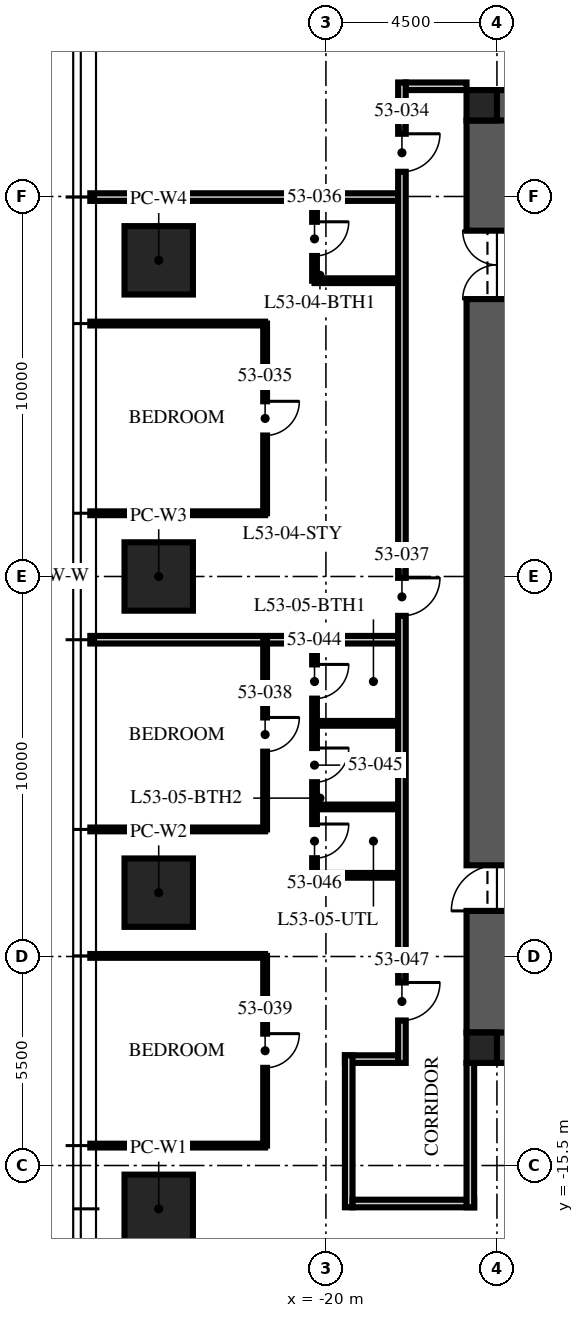
"""IFC4 building model, lengths in metres.
Left out: names, types, materials, properties, quantities, classifications, styles, units other than length and angle.
Written with IfcOpenShell. Run it as: python <this file> out.ifc"""

import sys

from ifc_helpers import new_model, si_unit, direction, frame, frame_2d, origin, origin_2d, place, context, subcontext, project, spatial, rectangle, extrude, element, fill, save


model = new_model("IFC4")
c1 = context("Model", 3, precision=1e-05, world=origin(), true_north=direction((0.0, 1.0)))
c2 = subcontext(c1, "Body", "Model", "MODEL_VIEW")
j1 = project(units=[si_unit("LENGTHUNIT", "METRE"), si_unit("PLANEANGLEUNIT", "RADIAN")], contexts=[c1])
p1 = place(None, origin())
s1 = spatial("IfcSite", under=j1, at=p1, CompositionType="ELEMENT")
p2 = place(p1, origin())
s2 = spatial("IfcBuilding", under=s1, at=p2, CompositionType="ELEMENT")
p3 = place(p2, frame((0.0, 0.0, 214.5)))
s3 = spatial("IfcBuildingStorey", under=s2, at=p3, CompositionType="ELEMENT", Elevation=214.5)
for number, where, z_axis, x_axis in (
    (1, (-15.5, 12.0, -0.25), (0.0, 0.0, 1.0), (1.0, 0.0, 0.0)),
    (2, (-15.5, -12.0, -0.25), (0.0, 0.0, 1.0), (1.0, 0.0, 0.0)),
):
    element("IfcWall", number, at=place(p3, frame(where, z_axis=z_axis, x_axis=x_axis)), inside=s3, PredefinedType="SHEAR", context=c2, shape_type="SweptSolid", body=[
        extrude(rectangle(XDim=31.0, YDim=1.6, at=frame_2d((15.5, 0.0))), origin(), (0.0, 0.0, 1.0), 3.75),
    ])
p4 = place(p3, frame((-15.5, -12.0, -0.25), z_axis=(0.0, 0.0, 1.0), x_axis=(0.0, 1.0, 0.0)))
e3 = element("IfcWall", 3, at=p4, inside=s3, PredefinedType="SHEAR", context=c2, shape_type="SweptSolid", body=[
    extrude(rectangle(XDim=24.0, YDim=1.6, at=frame_2d((12.0, 0.0))), origin(), (0.0, 0.0, 1.0), 3.75),
])
p5 = place(p4, frame((3.2, 0.0, 0.25)))
e4 = element("IfcOpeningElement", 4, at=p5, cuts=e3, PredefinedType="OPENING", context=c2, shape_type="SweptSolid", body=[
    extrude(rectangle(XDim=1.2, YDim=2.1, at=frame_2d((0.6, 1.05))), frame((0.0, 0.81, 0.0), z_axis=(0.0, -1.0, 0.0), x_axis=(1.0, 0.0, 0.0)), (0.0, 0.0, 1.0), 1.62),
])
p6 = place(p4, frame((19.3, 0.0, 0.25)))
e5 = element("IfcOpeningElement", 5, at=p6, cuts=e3, PredefinedType="OPENING", context=c2, shape_type="SweptSolid", body=[
    extrude(rectangle(XDim=1.8, YDim=2.1, at=frame_2d((0.9, 1.05))), frame((0.0, 0.81, 0.0), z_axis=(0.0, -1.0, 0.0), x_axis=(1.0, 0.0, 0.0)), (0.0, 0.0, 1.0), 1.62),
])
for number, where, z_axis, x_axis in (
    (6, (-15.9, 12.4, -0.25), (0.0, 0.0, 1.0), (1.0, 0.0, 0.0)),
    (7, (-15.9, -12.4, -0.25), (0.0, 0.0, 1.0), (1.0, 0.0, 0.0)),
):
    element("IfcColumn", number, at=place(p3, frame(where, z_axis=z_axis, x_axis=x_axis)), inside=s3, PredefinedType="COLUMN", context=c2, shape_type="SweptSolid", body=[
        extrude(rectangle(XDim=0.8, YDim=0.8, at=origin_2d()), origin(), (0.0, 0.0, 1.0), 3.75),
    ])
for number, where, z_axis, x_axis in (
    (8, (-24.4, -16.64, 0.0), (0.0, 0.0, 1.0), (0.0, 1.0, 0.0)),
    (9, (-24.4, -8.32, 0.0), (0.0, 0.0, 1.0), (0.0, 1.0, 0.0)),
    (10, (-24.4, 0.0, 0.0), (0.0, 0.0, 1.0), (0.0, 1.0, 0.0)),
    (11, (-24.4, 8.32, 0.0), (0.0, 0.0, 1.0), (0.0, 1.0, 0.0)),
):
    element("IfcColumn", number, at=place(p3, frame(where, z_axis=z_axis, x_axis=x_axis)), inside=s3, PredefinedType="COLUMN", context=c2, shape_type="SweptSolid", body=[
        extrude(rectangle(XDim=1.8, YDim=1.8, at=origin_2d()), origin(), (0.0, 0.0, 1.0), 3.75),
    ])
p7 = place(p3, frame((-18.1, -12.7, 0.0), z_axis=(0.0, 0.0, 1.0), x_axis=(-1.0, 0.0, 0.0)))
e12 = element("IfcWall", 12, at=p7, inside=s3, PredefinedType="PARTITIONING", context=c2, shape_type="SweptSolid", body=[
    extrude(rectangle(XDim=1.4, YDim=0.2, at=frame_2d((0.7, 0.0))), origin(), (0.0, 0.0, 1.0), 2.81),
])
p8 = place(p3, frame((-19.4, -12.6, 0.0), z_axis=(0.0, 0.0, 1.0), x_axis=(0.0, -1.0, 0.0)))
e13 = element("IfcWall", 13, at=p8, inside=s3, PredefinedType="PARTITIONING", context=c2, shape_type="SweptSolid", body=[
    extrude(rectangle(XDim=4.0, YDim=0.2, at=frame_2d((2.0, 0.0))), origin(), (0.0, 0.0, 1.0), 2.6),
])
p9 = place(p3, frame((-19.3, -16.5, 0.0), z_axis=(0.0, 0.0, 1.0), x_axis=(1.0, 0.0, 0.0)))
e14 = element("IfcWall", 14, at=p9, inside=s3, PredefinedType="PARTITIONING", context=c2, shape_type="SweptSolid", body=[
    extrude(rectangle(XDim=3.2, YDim=0.2, at=frame_2d((1.6, 0.0))), origin(), (0.0, 0.0, 1.0), 2.3),
])
p10 = place(p3, frame((-16.2, -16.6, 0.0), z_axis=(0.0, 0.0, 1.0), x_axis=(0.0, 1.0, 0.0)))
e15 = element("IfcWall", 15, at=p10, inside=s3, PredefinedType="PARTITIONING", context=c2, shape_type="SweptSolid", body=[
    extrude(rectangle(XDim=3.8, YDim=0.2, at=frame_2d((1.9, 0.0))), origin(), (0.0, 0.0, 1.0), 2.3),
])
p11 = place(p3, frame((-16.3, 12.9, 0.0), z_axis=(0.0, 0.0, 1.0), x_axis=(-1.0, 0.0, 0.0)))
e16 = element("IfcWall", 16, at=p11, inside=s3, PredefinedType="PARTITIONING", context=c2, shape_type="SweptSolid", body=[
    extrude(rectangle(XDim=1.6, YDim=0.2, at=frame_2d((0.8, 0.0))), origin(), (0.0, 0.0, 1.0), 2.3),
])
p12 = place(p3, frame((-18.1, 9.984, 0.0), z_axis=(0.0, 0.0, 1.0), x_axis=(-1.0, 0.0, 0.0)))
e17 = element("IfcWall", 17, at=p12, inside=s3, PredefinedType="PARTITIONING", context=c2, shape_type="SweptSolid", body=[
    extrude(rectangle(XDim=8.1, YDim=0.2, at=frame_2d((4.05, 0.0))), origin(), (0.0, 0.0, 1.0), 2.91),
])
for number, where, z_axis, x_axis in (
    (18, (-21.6, 6.656, 0.0), (0.0, 0.0, 1.0), (-1.0, 0.0, 0.0)),
    (19, (-21.6, 1.664, 0.0), (0.0, 0.0, 1.0), (-1.0, 0.0, 0.0)),
):
    element("IfcWall", number, at=place(p3, frame(where, z_axis=z_axis, x_axis=x_axis)), inside=s3, PredefinedType="PARTITIONING", context=c2, shape_type="SweptSolid", body=[
        extrude(rectangle(XDim=4.6, YDim=0.1, at=frame_2d((2.3, 0.0))), origin(), (0.0, 0.0, 1.0), 2.91),
    ])
p13 = place(p3, frame((-18.1, -1.664, 0.0), z_axis=(0.0, 0.0, 1.0), x_axis=(-1.0, 0.0, 0.0)))
e20 = element("IfcWall", 20, at=p13, inside=s3, PredefinedType="PARTITIONING", context=c2, shape_type="SweptSolid", body=[
    extrude(rectangle(XDim=8.1, YDim=0.2, at=frame_2d((4.05, 0.0))), origin(), (0.0, 0.0, 1.0), 2.91),
])
for number, where, z_axis, x_axis in (
    (21, (-21.6, -6.656, 0.0), (0.0, 0.0, 1.0), (-1.0, 0.0, 0.0)),
    (22, (-21.6, -9.984, 0.0), (0.0, 0.0, 1.0), (-1.0, 0.0, 0.0)),
    (23, (-21.6, -14.976, 0.0), (0.0, 0.0, 1.0), (-1.0, 0.0, 0.0)),
):
    element("IfcWall", number, at=place(p3, frame(where, z_axis=z_axis, x_axis=x_axis)), inside=s3, PredefinedType="PARTITIONING", context=c2, shape_type="SweptSolid", body=[
        extrude(rectangle(XDim=4.6, YDim=0.1, at=frame_2d((2.3, 0.0))), origin(), (0.0, 0.0, 1.0), 2.91),
    ])
p14 = place(p3, frame((-21.6, 6.656, 0.0), z_axis=(0.0, 0.0, 1.0), x_axis=(0.0, -1.0, 0.0)))
e24 = element("IfcWall", 24, at=p14, inside=s3, PredefinedType="PARTITIONING", context=c2, shape_type="SweptSolid", body=[
    extrude(rectangle(XDim=4.992, YDim=0.1, at=frame_2d((2.496, 0.0))), origin(), (0.0, 0.0, 1.0), 2.81),
])
p15 = place(p14, frame((2.046, 0.0, 0.0)))
e25 = element("IfcOpeningElement", 25, at=p15, cuts=e24, PredefinedType="OPENING", context=c2, shape_type="SweptSolid", body=[
    extrude(rectangle(XDim=0.9, YDim=2.1, at=frame_2d((0.45, 1.05))), frame((0.0, 0.06, 0.0), z_axis=(0.0, -1.0, 0.0), x_axis=(1.0, 0.0, 0.0)), (0.0, 0.0, 1.0), 0.12),
])
p16 = place(p3, frame((-20.3, 9.984, 0.0), z_axis=(0.0, 0.0, 1.0), x_axis=(0.0, -1.0, 0.0)))
e26 = element("IfcWall", 26, at=p16, inside=s3, PredefinedType="PARTITIONING", context=c2, shape_type="SweptSolid", body=[
    extrude(rectangle(XDim=2.2, YDim=0.125, at=frame_2d((1.1, 0.0))), origin(), (0.0, 0.0, 1.0), 2.6),
])
p17 = place(p16, frame((0.65, 0.0, 0.0)))
e27 = element("IfcOpeningElement", 27, at=p17, cuts=e26, PredefinedType="OPENING", context=c2, shape_type="SweptSolid", body=[
    extrude(rectangle(XDim=0.9, YDim=2.1, at=frame_2d((0.45, 1.05))), frame((0.0, 0.073, 0.0), z_axis=(0.0, -1.0, 0.0), x_axis=(1.0, 0.0, 0.0)), (0.0, 0.0, 1.0), 0.145),
])
p18 = place(p3, frame((-18.1, 7.784, 0.0), z_axis=(0.0, 0.0, 1.0), x_axis=(-1.0, 0.0, 0.0)))
e28 = element("IfcWall", 28, at=p18, inside=s3, PredefinedType="PARTITIONING", context=c2, shape_type="SweptSolid", body=[
    extrude(rectangle(XDim=2.2, YDim=0.125, at=frame_2d((1.1, 0.0))), origin(), (0.0, 0.0, 1.0), 3.5),
])
p19 = place(p3, frame((-21.6, -1.664, 0.0), z_axis=(0.0, 0.0, 1.0), x_axis=(0.0, -1.0, 0.0)))
e29 = element("IfcWall", 29, at=p19, inside=s3, PredefinedType="PARTITIONING", context=c2, shape_type="SweptSolid", body=[
    extrude(rectangle(XDim=4.992, YDim=0.1, at=frame_2d((2.496, 0.0))), origin(), (0.0, 0.0, 1.0), 2.81),
])
p20 = place(p19, frame((2.046, 0.0, 0.0)))
e30 = element("IfcOpeningElement", 30, at=p20, cuts=e29, PredefinedType="OPENING", context=c2, shape_type="SweptSolid", body=[
    extrude(rectangle(XDim=0.9, YDim=2.1, at=frame_2d((0.45, 1.05))), frame((0.0, 0.06, 0.0), z_axis=(0.0, -1.0, 0.0), x_axis=(1.0, 0.0, 0.0)), (0.0, 0.0, 1.0), 0.12),
])
p21 = place(p3, frame((-21.6, -9.984, 0.0), z_axis=(0.0, 0.0, 1.0), x_axis=(0.0, -1.0, 0.0)))
e31 = element("IfcWall", 31, at=p21, inside=s3, PredefinedType="PARTITIONING", context=c2, shape_type="SweptSolid", body=[
    extrude(rectangle(XDim=4.992, YDim=0.1, at=frame_2d((2.496, 0.0))), origin(), (0.0, 0.0, 1.0), 2.81),
])
p22 = place(p21, frame((2.046, 0.0, 0.0)))
e32 = element("IfcOpeningElement", 32, at=p22, cuts=e31, PredefinedType="OPENING", context=c2, shape_type="SweptSolid", body=[
    extrude(rectangle(XDim=0.9, YDim=2.1, at=frame_2d((0.45, 1.05))), frame((0.0, 0.06, 0.0), z_axis=(0.0, -1.0, 0.0), x_axis=(1.0, 0.0, 0.0)), (0.0, 0.0, 1.0), 0.12),
])
p23 = place(p3, frame((-20.3, -1.664, 0.0), z_axis=(0.0, 0.0, 1.0), x_axis=(0.0, -1.0, 0.0)))
e33 = element("IfcWall", 33, at=p23, inside=s3, PredefinedType="PARTITIONING", context=c2, shape_type="SweptSolid", body=[
    extrude(rectangle(XDim=6.2, YDim=0.125, at=frame_2d((3.1, 0.0))), origin(), (0.0, 0.0, 1.0), 2.81),
])
p24 = place(p23, frame((0.65, 0.0, 0.0)))
e34 = element("IfcOpeningElement", 34, at=p24, cuts=e33, PredefinedType="OPENING", context=c2, shape_type="SweptSolid", body=[
    extrude(rectangle(XDim=0.9, YDim=2.1, at=frame_2d((0.45, 1.05))), frame((0.0, 0.073, 0.0), z_axis=(0.0, -1.0, 0.0), x_axis=(1.0, 0.0, 0.0)), (0.0, 0.0, 1.0), 0.145),
])
p25 = place(p23, frame((2.85, 0.0, 0.0)))
e35 = element("IfcOpeningElement", 35, at=p25, cuts=e33, PredefinedType="OPENING", context=c2, shape_type="SweptSolid", body=[
    extrude(rectangle(XDim=0.9, YDim=2.1, at=frame_2d((0.45, 1.05))), frame((0.0, 0.073, 0.0), z_axis=(0.0, -1.0, 0.0), x_axis=(1.0, 0.0, 0.0)), (0.0, 0.0, 1.0), 0.145),
])
p26 = place(p23, frame((4.85, 0.0, 0.0)))
e36 = element("IfcOpeningElement", 36, at=p26, cuts=e33, PredefinedType="OPENING", context=c2, shape_type="SweptSolid", body=[
    extrude(rectangle(XDim=0.9, YDim=2.1, at=frame_2d((0.45, 1.05))), frame((0.0, 0.073, 0.0), z_axis=(0.0, -1.0, 0.0), x_axis=(1.0, 0.0, 0.0)), (0.0, 0.0, 1.0), 0.145),
])
for number, where, z_axis, x_axis in (
    (37, (-18.1, -3.864, 0.0), (0.0, 0.0, 1.0), (-1.0, 0.0, 0.0)),
    (38, (-18.1, -6.064, 0.0), (0.0, 0.0, 1.0), (-1.0, 0.0, 0.0)),
    (39, (-18.1, -7.864, 0.0), (0.0, 0.0, 1.0), (-1.0, 0.0, 0.0)),
):
    element("IfcWall", number, at=place(p3, frame(where, z_axis=z_axis, x_axis=x_axis)), inside=s3, PredefinedType="PARTITIONING", context=c2, shape_type="SweptSolid", body=[
        extrude(rectangle(XDim=2.2, YDim=0.125, at=frame_2d((1.1, 0.0))), origin(), (0.0, 0.0, 1.0), 3.5),
    ])
p27 = place(p3, frame((-18.0, 13.0, 0.0), z_axis=(0.0, 0.0, 1.0), x_axis=(0.0, -1.0, 0.0)))
e40 = element("IfcWall", 40, at=p27, inside=s3, PredefinedType="PARTITIONING", context=c2, shape_type="SweptSolid", body=[
    extrude(rectangle(XDim=25.8, YDim=0.2, at=frame_2d((12.9, 0.0))), origin(), (0.0, 0.0, 1.0), 2.6),
])
p28 = place(p27, frame((1.35, 0.0, 0.0)))
e41 = element("IfcOpeningElement", 41, at=p28, cuts=e40, PredefinedType="OPENING", context=c2, shape_type="SweptSolid", body=[
    extrude(rectangle(XDim=1.0, YDim=2.2, at=frame_2d((0.5, 1.1))), frame((0.0, 0.11, 0.0), z_axis=(0.0, -1.0, 0.0), x_axis=(1.0, 0.0, 0.0)), (0.0, 0.0, 1.0), 0.22),
])
p29 = place(p27, frame((13.036, 0.0, 0.0)))
e42 = element("IfcOpeningElement", 42, at=p29, cuts=e40, PredefinedType="OPENING", context=c2, shape_type="SweptSolid", body=[
    extrude(rectangle(XDim=1.0, YDim=2.2, at=frame_2d((0.5, 1.1))), frame((0.0, 0.11, 0.0), z_axis=(0.0, -1.0, 0.0), x_axis=(1.0, 0.0, 0.0)), (0.0, 0.0, 1.0), 0.22),
])
p30 = place(p27, frame((23.684, 0.0, 0.0)))
e43 = element("IfcOpeningElement", 43, at=p30, cuts=e40, PredefinedType="OPENING", context=c2, shape_type="SweptSolid", body=[
    extrude(rectangle(XDim=1.0, YDim=2.2, at=frame_2d((0.5, 1.1))), frame((0.0, 0.11, 0.0), z_axis=(0.0, -1.0, 0.0), x_axis=(1.0, 0.0, 0.0)), (0.0, 0.0, 1.0), 0.22),
])
p31 = place(p5, origin())
e44 = element("IfcDoor", 44, at=p31, inside=s3, OperationType="SINGLE_SWING_LEFT", PredefinedType="DOOR", context=c2, shape_type="SweptSolid", body=[
    extrude(rectangle(XDim=1.2, YDim=2.1, at=frame_2d((0.6, 1.05))), frame((0.0, 0.025, 0.0), z_axis=(0.0, -1.0, 0.0), x_axis=(1.0, 0.0, 0.0)), (0.0, 0.0, 1.0), 0.05),
])
fill(e4, e44)
p32 = place(p6, origin())
e45 = element("IfcDoor", 45, at=p32, inside=s3, OperationType="DOUBLE_DOOR_SINGLE_SWING", PredefinedType="DOOR", context=c2, shape_type="SweptSolid", body=[
    extrude(rectangle(XDim=1.8, YDim=2.1, at=frame_2d((0.9, 1.05))), frame((0.0, 0.025, 0.0), z_axis=(0.0, -1.0, 0.0), x_axis=(1.0, 0.0, 0.0)), (0.0, 0.0, 1.0), 0.05),
])
fill(e5, e45)
p33 = place(p28, origin())
e46 = element("IfcDoor", 46, at=p33, inside=s3, OperationType="SINGLE_SWING_LEFT", PredefinedType="DOOR", context=c2, shape_type="SweptSolid", body=[
    extrude(rectangle(XDim=1.0, YDim=2.2, at=frame_2d((0.5, 1.1))), frame((0.0, 0.025, 0.0), z_axis=(0.0, -1.0, 0.0), x_axis=(1.0, 0.0, 0.0)), (0.0, 0.0, 1.0), 0.05),
])
fill(e41, e46)
p34 = place(p15, origin())
e47 = element("IfcDoor", 47, at=p34, inside=s3, OperationType="SINGLE_SWING_LEFT", PredefinedType="DOOR", context=c2, shape_type="SweptSolid", body=[
    extrude(rectangle(XDim=0.9, YDim=2.1, at=frame_2d((0.45, 1.05))), frame((0.0, 0.025, 0.0), z_axis=(0.0, -1.0, 0.0), x_axis=(1.0, 0.0, 0.0)), (0.0, 0.0, 1.0), 0.05),
])
fill(e25, e47)
p35 = place(p17, origin())
e48 = element("IfcDoor", 48, at=p35, inside=s3, OperationType="SINGLE_SWING_LEFT", PredefinedType="DOOR", context=c2, shape_type="SweptSolid", body=[
    extrude(rectangle(XDim=0.9, YDim=2.1, at=frame_2d((0.45, 1.05))), frame((0.0, 0.025, 0.0), z_axis=(0.0, -1.0, 0.0), x_axis=(1.0, 0.0, 0.0)), (0.0, 0.0, 1.0), 0.05),
])
fill(e27, e48)
p36 = place(p29, origin())
e49 = element("IfcDoor", 49, at=p36, inside=s3, OperationType="SINGLE_SWING_LEFT", PredefinedType="DOOR", context=c2, shape_type="SweptSolid", body=[
    extrude(rectangle(XDim=1.0, YDim=2.2, at=frame_2d((0.5, 1.1))), frame((0.0, 0.025, 0.0), z_axis=(0.0, -1.0, 0.0), x_axis=(1.0, 0.0, 0.0)), (0.0, 0.0, 1.0), 0.05),
])
fill(e42, e49)
p37 = place(p20, origin())
e50 = element("IfcDoor", 50, at=p37, inside=s3, OperationType="SINGLE_SWING_LEFT", PredefinedType="DOOR", context=c2, shape_type="SweptSolid", body=[
    extrude(rectangle(XDim=0.9, YDim=2.1, at=frame_2d((0.45, 1.05))), frame((0.0, 0.025, 0.0), z_axis=(0.0, -1.0, 0.0), x_axis=(1.0, 0.0, 0.0)), (0.0, 0.0, 1.0), 0.05),
])
fill(e30, e50)
p38 = place(p22, origin())
e51 = element("IfcDoor", 51, at=p38, inside=s3, OperationType="SINGLE_SWING_LEFT", PredefinedType="DOOR", context=c2, shape_type="SweptSolid", body=[
    extrude(rectangle(XDim=0.9, YDim=2.1, at=frame_2d((0.45, 1.05))), frame((0.0, 0.025, 0.0), z_axis=(0.0, -1.0, 0.0), x_axis=(1.0, 0.0, 0.0)), (0.0, 0.0, 1.0), 0.05),
])
fill(e32, e51)
p39 = place(p24, origin())
e52 = element("IfcDoor", 52, at=p39, inside=s3, OperationType="SINGLE_SWING_LEFT", PredefinedType="DOOR", context=c2, shape_type="SweptSolid", body=[
    extrude(rectangle(XDim=0.9, YDim=2.1, at=frame_2d((0.45, 1.05))), frame((0.0, 0.025, 0.0), z_axis=(0.0, -1.0, 0.0), x_axis=(1.0, 0.0, 0.0)), (0.0, 0.0, 1.0), 0.05),
])
fill(e34, e52)
p40 = place(p25, origin())
e53 = element("IfcDoor", 53, at=p40, inside=s3, OperationType="SINGLE_SWING_LEFT", PredefinedType="DOOR", context=c2, shape_type="SweptSolid", body=[
    extrude(rectangle(XDim=0.9, YDim=2.1, at=frame_2d((0.45, 1.05))), frame((0.0, 0.025, 0.0), z_axis=(0.0, -1.0, 0.0), x_axis=(1.0, 0.0, 0.0)), (0.0, 0.0, 1.0), 0.05),
])
fill(e35, e53)
p41 = place(p26, origin())
e54 = element("IfcDoor", 54, at=p41, inside=s3, OperationType="SINGLE_SWING_LEFT", PredefinedType="DOOR", context=c2, shape_type="SweptSolid", body=[
    extrude(rectangle(XDim=0.9, YDim=2.1, at=frame_2d((0.45, 1.05))), frame((0.0, 0.025, 0.0), z_axis=(0.0, -1.0, 0.0), x_axis=(1.0, 0.0, 0.0)), (0.0, 0.0, 1.0), 0.05),
])
fill(e36, e54)
p42 = place(p30, origin())
e55 = element("IfcDoor", 55, at=p42, inside=s3, OperationType="SINGLE_SWING_LEFT", PredefinedType="DOOR", context=c2, shape_type="SweptSolid", body=[
    extrude(rectangle(XDim=1.0, YDim=2.2, at=frame_2d((0.5, 1.1))), frame((0.0, 0.025, 0.0), z_axis=(0.0, -1.0, 0.0), x_axis=(1.0, 0.0, 0.0)), (0.0, 0.0, 1.0), 0.05),
])
fill(e43, e55)
save(model, sys.argv[1])
